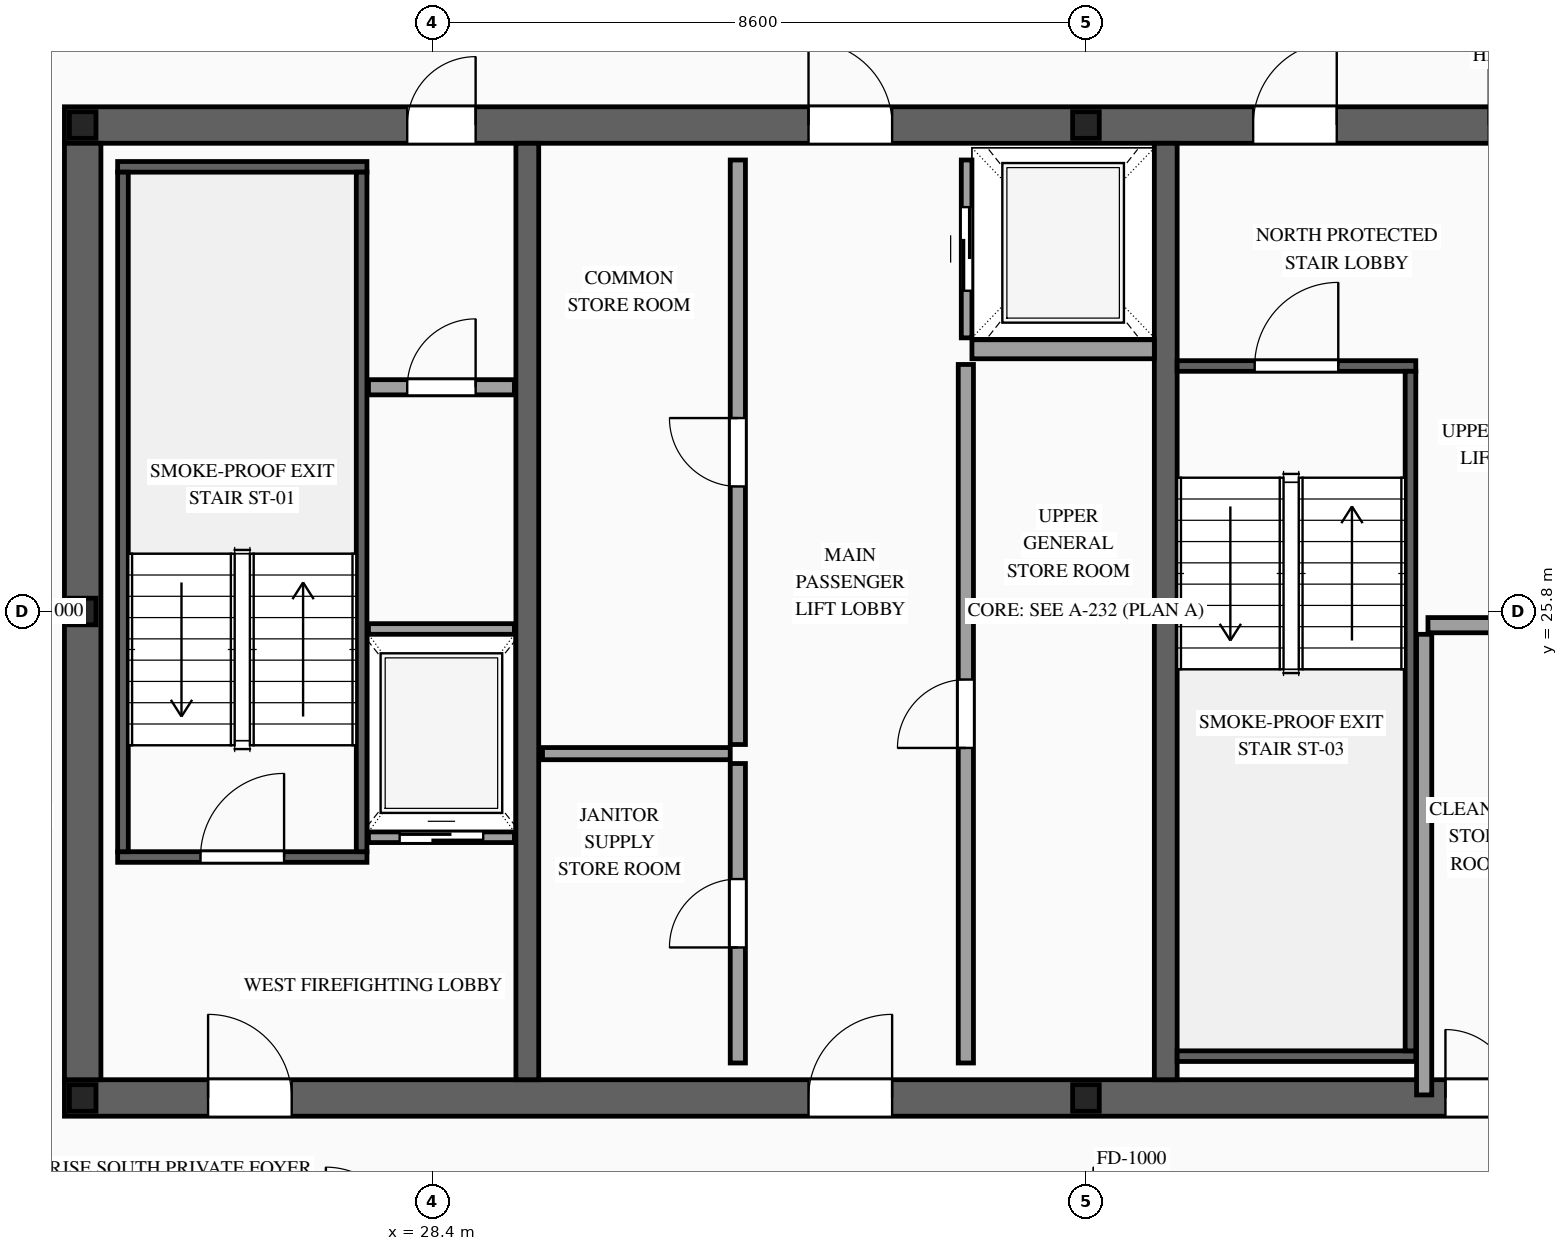
"""IFC4 building model, lengths in metres.
Left out: names, types, materials, properties, quantities, classifications, styles, units other than length and angle.
Written with IfcOpenShell. Run it as: python <this file> out.ifc"""

import sys

from ifc_helpers import new_model, si_unit, direction, frame, frame_2d, origin, origin_2d, place, context, subcontext, project, spatial, rectangle, i_section, extrude, source, transform, mapped, element, fill, save


model = new_model("IFC4")
c1 = context("Model", 3, precision=1e-05, world=origin(), true_north=direction((0.0, 1.0)))
c2 = subcontext(c1, "Body", "Model", "MODEL_VIEW")
j1 = project(units=[si_unit("LENGTHUNIT", "METRE"), si_unit("PLANEANGLEUNIT", "RADIAN")], contexts=[c1])
p1 = place(None, origin())
s1 = spatial("IfcSite", under=j1, at=p1, CompositionType="ELEMENT")
p2 = place(p1, origin())
s2 = spatial("IfcBuilding", under=s1, at=p2, CompositionType="ELEMENT")
p3 = place(p2, frame((0.0, 0.0, 332.2)))
s3 = spatial("IfcBuildingStorey", under=s2, at=p3, CompositionType="ELEMENT", Elevation=332.2)
p4 = place(p3, frame((23.56, 19.4, 0.0), z_axis=(0.0, 0.0, 1.0), x_axis=(1.0, 0.0, 0.0)))
e1 = element("IfcWall", 1, at=p4, inside=s3, PredefinedType="SHEAR", context=c2, shape_type="SweptSolid", body=[
    extrude(rectangle(XDim=26.88, YDim=0.48, at=frame_2d((13.44, 0.0))), origin(), (0.0, 0.0, 1.0), 3.5),
])
p5 = place(p4, frame((1.89, 0.0, 0.0)))
e2 = element("IfcOpeningElement", 2, at=p5, cuts=e1, PredefinedType="OPENING", context=c2, shape_type="SweptSolid", body=[
    extrude(rectangle(XDim=1.1, YDim=2.2, at=frame_2d((0.55, 1.1))), frame((0.0, 0.255, 0.0), z_axis=(0.0, -1.0, 0.0), x_axis=(1.0, 0.0, 0.0)), (0.0, 0.0, 1.0), 0.51),
])
p6 = place(p4, frame((9.79, 0.0, 0.0)))
e3 = element("IfcOpeningElement", 3, at=p6, cuts=e1, PredefinedType="OPENING", context=c2, shape_type="SweptSolid", body=[
    extrude(rectangle(XDim=1.1, YDim=2.2, at=frame_2d((0.55, 1.1))), frame((0.0, 0.255, 0.0), z_axis=(0.0, -1.0, 0.0), x_axis=(1.0, 0.0, 0.0)), (0.0, 0.0, 1.0), 0.51),
])
p7 = place(p4, frame((22.99, 0.0, 0.0)))
e4 = element("IfcOpeningElement", 4, at=p7, cuts=e1, PredefinedType="OPENING", context=c2, shape_type="SweptSolid", body=[
    extrude(rectangle(XDim=1.1, YDim=2.2, at=frame_2d((0.55, 1.1))), frame((0.0, 0.255, 0.0), z_axis=(0.0, -1.0, 0.0), x_axis=(1.0, 0.0, 0.0)), (0.0, 0.0, 1.0), 0.51),
])
p8 = place(p4, frame((19.61, 0.0, 0.0)))
e5 = element("IfcOpeningElement", 5, at=p8, cuts=e1, PredefinedType="OPENING", context=c2, shape_type="SweptSolid", body=[
    extrude(rectangle(XDim=0.9, YDim=2.15, at=frame_2d((0.45, 1.075))), frame((0.0, 0.255, 0.0), z_axis=(0.0, -1.0, 0.0), x_axis=(1.0, 0.0, 0.0)), (0.0, 0.0, 1.0), 0.51),
])
p9 = place(p4, frame((18.17, 0.0, 0.0)))
e6 = element("IfcOpeningElement", 6, at=p9, cuts=e1, PredefinedType="OPENING", context=c2, shape_type="SweptSolid", body=[
    extrude(rectangle(XDim=0.9, YDim=2.15, at=frame_2d((0.45, 1.075))), frame((0.0, 0.255, 0.0), z_axis=(0.0, -1.0, 0.0), x_axis=(1.0, 0.0, 0.0)), (0.0, 0.0, 1.0), 0.51),
])
p10 = place(p3, frame((23.56, 32.2, 0.0), z_axis=(0.0, 0.0, 1.0), x_axis=(1.0, 0.0, 0.0)))
e7 = element("IfcWall", 7, at=p10, inside=s3, PredefinedType="SHEAR", context=c2, shape_type="SweptSolid", body=[
    extrude(rectangle(XDim=26.88, YDim=0.48, at=frame_2d((13.44, 0.0))), origin(), (0.0, 0.0, 1.0), 3.5),
])
p11 = place(p10, frame((4.51, 0.0, 0.0)))
e8 = element("IfcOpeningElement", 8, at=p11, cuts=e7, PredefinedType="OPENING", context=c2, shape_type="SweptSolid", body=[
    extrude(rectangle(XDim=0.9, YDim=2.15, at=frame_2d((0.45, 1.075))), frame((0.0, 0.255, 0.0), z_axis=(0.0, -1.0, 0.0), x_axis=(1.0, 0.0, 0.0)), (0.0, 0.0, 1.0), 0.51),
])
p12 = place(p10, frame((9.79, 0.0, 0.0)))
e9 = element("IfcOpeningElement", 9, at=p12, cuts=e7, PredefinedType="OPENING", context=c2, shape_type="SweptSolid", body=[
    extrude(rectangle(XDim=1.1, YDim=2.2, at=frame_2d((0.55, 1.1))), frame((0.0, 0.255, 0.0), z_axis=(0.0, -1.0, 0.0), x_axis=(1.0, 0.0, 0.0)), (0.0, 0.0, 1.0), 0.51),
])
p13 = place(p10, frame((15.64, 0.0, 0.0)))
e10 = element("IfcOpeningElement", 10, at=p13, cuts=e7, PredefinedType="OPENING", context=c2, shape_type="SweptSolid", body=[
    extrude(rectangle(XDim=1.1, YDim=2.2, at=frame_2d((0.55, 1.1))), frame((0.0, 0.255, 0.0), z_axis=(0.0, -1.0, 0.0), x_axis=(1.0, 0.0, 0.0)), (0.0, 0.0, 1.0), 0.51),
])
p14 = place(p10, frame((18.74, 0.0, 0.0)))
e11 = element("IfcOpeningElement", 11, at=p14, cuts=e7, PredefinedType="OPENING", context=c2, shape_type="SweptSolid", body=[
    extrude(rectangle(XDim=1.1, YDim=2.2, at=frame_2d((0.55, 1.1))), frame((0.0, 0.255, 0.0), z_axis=(0.0, -1.0, 0.0), x_axis=(1.0, 0.0, 0.0)), (0.0, 0.0, 1.0), 0.51),
])
m1 = source(origin(), c2, "Body", "SweptSolid", [
    extrude(rectangle(XDim=12.32, YDim=0.48, at=frame_2d((6.16, 0.0))), origin(), (0.0, 0.0, 1.0), 3.5),
])
p15 = place(p3, frame((23.8, 19.64, 0.0), z_axis=(0.0, 0.0, 1.0), x_axis=(0.0, 1.0, 0.0)))
e12 = element("IfcWall", 12, at=p15, inside=s3, PredefinedType="SHEAR", context=c2, shape_type="MappedRepresentation", body=[
    mapped(m1, transform((0.0, 0.0, 0.0), scale=1.0)),
])
m2 = source(origin(), c2, "Body", "SweptSolid", [
    extrude(rectangle(XDim=12.32, YDim=0.3, at=frame_2d((6.16, 0.0))), origin(), (0.0, 0.0, 1.0), 3.5),
])
for number, where, z_axis, x_axis in (
    (13, (29.65, 19.64, 0.0), (0.0, 0.0, 1.0), (0.0, 1.0, 0.0)),
    (14, (38.05, 19.64, 0.0), (0.0, 0.0, 1.0), (0.0, 1.0, 0.0)),
):
    element("IfcWall", number, at=place(p3, frame(where, z_axis=z_axis, x_axis=x_axis)), inside=s3, PredefinedType="SOLIDWALL", context=c2, shape_type="MappedRepresentation", body=[
        mapped(m2, transform((0.0, 0.0, 0.0), scale=1.0)),
    ])
m3 = source(origin(), c2, "Body", "SweptSolid", [
    extrude(i_section(OverallWidth=0.35, OverallDepth=0.35, WebThickness=0.012, FlangeThickness=0.019, at=origin_2d()), origin(), (0.0, 0.0, 1.0), 3.5),
])
for number, where, z_axis, x_axis in (
    (15, (23.8, 19.4, 0.0), (0.0, 0.0, 1.0), (1.0, 0.0, 0.0)),
    (16, (37.0, 19.4, 0.0), (0.0, 0.0, 1.0), (1.0, 0.0, 0.0)),
    (17, (23.8, 25.8, 0.0), (0.0, 0.0, 1.0), (1.0, 0.0, 0.0)),
    (18, (23.8, 32.2, 0.0), (0.0, 0.0, 1.0), (1.0, 0.0, 0.0)),
    (19, (37.0, 32.2, 0.0), (0.0, 0.0, 1.0), (1.0, 0.0, 0.0)),
):
    element("IfcColumn", number, at=place(p3, frame(where, z_axis=z_axis, x_axis=x_axis)), inside=s3, PredefinedType="COLUMN", context=c2, shape_type="MappedRepresentation", body=[
        mapped(m3, transform((0.0, 0.0, 0.0), scale=1.0)),
    ])
p16 = place(p3, frame((27.56, 22.83, 0.0), z_axis=(0.0, 0.0, 1.0), x_axis=(1.0, 0.0, 0.0)))
e20 = element("IfcWall", 20, at=p16, inside=s3, PredefinedType="SOLIDWALL", context=c2, shape_type="SweptSolid", body=[
    extrude(rectangle(XDim=1.92, YDim=0.14, at=frame_2d((0.96, 0.0))), origin(), (0.0, 0.0, 1.0), 3.28),
])
p17 = place(p16, frame((0.41, 0.0, 0.0)))
e21 = element("IfcOpeningElement", 21, at=p17, cuts=e20, PredefinedType="OPENING", context=c2, shape_type="SweptSolid", body=[
    extrude(rectangle(XDim=1.1, YDim=2.2, at=frame_2d((0.55, 1.1))), frame((0.0, 0.085, 0.0), z_axis=(0.0, -1.0, 0.0), x_axis=(1.0, 0.0, 0.0)), (0.0, 0.0, 1.0), 0.17),
])
m4 = source(origin(), c2, "Body", "SweptSolid", [
    extrude(rectangle(XDim=1.92, YDim=0.14, at=frame_2d((0.96, 0.0))), origin(), (0.0, 0.0, 1.0), 3.28),
])
p18 = place(p3, frame((27.56, 25.57, 0.0), z_axis=(0.0, 0.0, 1.0), x_axis=(1.0, 0.0, 0.0)))
e22 = element("IfcWall", 22, at=p18, inside=s3, PredefinedType="SOLIDWALL", context=c2, shape_type="MappedRepresentation", body=[
    mapped(m4, transform((0.0, 0.0, 0.0), scale=1.0)),
])
p19 = place(p3, frame((35.43, 29.4, 0.0), z_axis=(0.0, 0.0, 1.0), x_axis=(0.0, 1.0, 0.0)))
e23 = element("IfcWall", 23, at=p19, inside=s3, PredefinedType="SOLIDWALL", context=c2, shape_type="SweptSolid", body=[
    extrude(rectangle(XDim=2.34, YDim=0.14, at=frame_2d((1.17, 0.0))), origin(), (0.0, 0.0, 1.0), 3.28),
])
p20 = place(p19, frame((0.62, 0.0, 0.0)))
e24 = element("IfcOpeningElement", 24, at=p20, cuts=e23, PredefinedType="OPENING", context=c2, shape_type="SweptSolid", body=[
    extrude(rectangle(XDim=1.1, YDim=2.2, at=frame_2d((0.55, 1.1))), frame((0.0, 0.085, 0.0), z_axis=(0.0, -1.0, 0.0), x_axis=(1.0, 0.0, 0.0)), (0.0, 0.0, 1.0), 0.17),
])
m5 = source(origin(), c2, "Body", "SweptSolid", [
    extrude(rectangle(XDim=2.4, YDim=0.25, at=frame_2d((1.2, 0.0))), origin(), (0.0, 0.0, 1.0), 3.28),
])
p21 = place(p3, frame((35.5, 29.25, 0.0), z_axis=(0.0, 0.0, 1.0), x_axis=(1.0, 0.0, 0.0)))
e25 = element("IfcWall", 25, at=p21, inside=s3, PredefinedType="SOLIDWALL", context=c2, shape_type="MappedRepresentation", body=[
    mapped(m5, transform((0.0, 0.0, 0.0), scale=1.0)),
])
p22 = place(p3, frame((24.26, 22.57, 0.0), z_axis=(0.0, 0.0, 1.0), x_axis=(1.0, 0.0, 0.0)))
e26 = element("IfcWall", 26, at=p22, inside=s3, PredefinedType="SOLIDWALL", context=c2, shape_type="SweptSolid", body=[
    extrude(rectangle(XDim=3.28, YDim=0.14, at=frame_2d((1.64, 0.0))), origin(), (0.0, 0.0, 1.0), 3.28),
])
p23 = place(p22, frame((1.09, 0.0, 0.0)))
e27 = element("IfcOpeningElement", 27, at=p23, cuts=e26, PredefinedType="OPENING", context=c2, shape_type="SweptSolid", body=[
    extrude(rectangle(XDim=1.1, YDim=2.2, at=frame_2d((0.55, 1.1))), frame((0.0, 0.085, 0.0), z_axis=(0.0, -1.0, 0.0), x_axis=(1.0, 0.0, 0.0)), (0.0, 0.0, 1.0), 0.17),
])
m6 = source(origin(), c2, "Body", "SweptSolid", [
    extrude(rectangle(XDim=3.28, YDim=0.14, at=frame_2d((1.64, 0.0))), origin(), (0.0, 0.0, 1.0), 3.28),
])
p24 = place(p3, frame((24.26, 31.65, 0.0), z_axis=(0.0, 0.0, 1.0), x_axis=(1.0, 0.0, 0.0)))
e28 = element("IfcWall", 28, at=p24, inside=s3, PredefinedType="SOLIDWALL", context=c2, shape_type="MappedRepresentation", body=[
    mapped(m6, transform((0.0, 0.0, 0.0), scale=1.0)),
])
m7 = source(origin(), c2, "Body", "SweptSolid", [
    extrude(rectangle(XDim=8.94, YDim=0.14, at=frame_2d((4.47, 0.0))), origin(), (0.0, 0.0, 1.0), 3.28),
])
for number, where, z_axis, x_axis in (
    (29, (24.33, 22.64, 0.0), (0.0, 0.0, 1.0), (0.0, 1.0, 0.0)),
    (30, (27.47, 22.64, 0.0), (0.0, 0.0, 1.0), (0.0, 1.0, 0.0)),
):
    element("IfcWall", number, at=place(p3, frame(where, z_axis=z_axis, x_axis=x_axis)), inside=s3, PredefinedType="SOLIDWALL", context=c2, shape_type="MappedRepresentation", body=[
        mapped(m7, transform((0.0, 0.0, 0.0), scale=1.0)),
    ])
p25 = place(p3, frame((38.2, 29.03, 0.0), z_axis=(0.0, 0.0, 1.0), x_axis=(1.0, 0.0, 0.0)))
e31 = element("IfcWall", 31, at=p25, inside=s3, PredefinedType="SOLIDWALL", context=c2, shape_type="SweptSolid", body=[
    extrude(rectangle(XDim=3.14, YDim=0.14, at=frame_2d((1.57, 0.0))), origin(), (0.0, 0.0, 1.0), 3.28),
])
p26 = place(p25, frame((1.02, 0.0, 0.0)))
e32 = element("IfcOpeningElement", 32, at=p26, cuts=e31, PredefinedType="OPENING", context=c2, shape_type="SweptSolid", body=[
    extrude(rectangle(XDim=1.1, YDim=2.2, at=frame_2d((0.55, 1.1))), frame((0.0, 0.085, 0.0), z_axis=(0.0, -1.0, 0.0), x_axis=(1.0, 0.0, 0.0)), (0.0, 0.0, 1.0), 0.17),
])
m8 = source(origin(), c2, "Body", "SweptSolid", [
    extrude(rectangle(XDim=3.14, YDim=0.14, at=frame_2d((1.57, 0.0))), origin(), (0.0, 0.0, 1.0), 3.28),
])
p27 = place(p3, frame((38.2, 19.95, 0.0), z_axis=(0.0, 0.0, 1.0), x_axis=(1.0, 0.0, 0.0)))
e33 = element("IfcWall", 33, at=p27, inside=s3, PredefinedType="SOLIDWALL", context=c2, shape_type="MappedRepresentation", body=[
    mapped(m8, transform((0.0, 0.0, 0.0), scale=1.0)),
])
m9 = source(origin(), c2, "Body", "SweptSolid", [
    extrude(rectangle(XDim=8.94, YDim=0.14, at=frame_2d((4.47, 0.0))), origin(), (0.0, 0.0, 1.0), 3.28),
])
p28 = place(p3, frame((41.27, 20.02, 0.0), z_axis=(0.0, 0.0, 1.0), x_axis=(0.0, 1.0, 0.0)))
e34 = element("IfcWall", 34, at=p28, inside=s3, PredefinedType="SOLIDWALL", context=c2, shape_type="MappedRepresentation", body=[
    mapped(m9, transform((0.0, 0.0, 0.0), scale=1.0)),
])
p29 = place(p3, frame((27.56, 28.75, 0.0), z_axis=(0.0, 0.0, 1.0), x_axis=(1.0, 0.0, 0.0)))
e35 = element("IfcWall", 35, at=p29, inside=s3, PredefinedType="PARTITIONING", context=c2, shape_type="SweptSolid", body=[
    extrude(rectangle(XDim=1.92, YDim=0.2, at=frame_2d((0.96, 0.0))), origin(), (0.0, 0.0, 1.0), 3.28),
])
p30 = place(p29, frame((0.51, 0.0, 0.0)))
e36 = element("IfcOpeningElement", 36, at=p30, cuts=e35, PredefinedType="OPENING", context=c2, shape_type="SweptSolid", body=[
    extrude(rectangle(XDim=0.9, YDim=2.15, at=frame_2d((0.45, 1.075))), frame((0.0, 0.115, 0.0), z_axis=(0.0, -1.0, 0.0), x_axis=(1.0, 0.0, 0.0)), (0.0, 0.0, 1.0), 0.23),
])
p31 = place(p3, frame((32.42, 19.86, 0.0), z_axis=(0.0, 0.0, 1.0), x_axis=(0.0, 1.0, 0.0)))
e37 = element("IfcWall", 37, at=p31, inside=s3, PredefinedType="PARTITIONING", context=c2, shape_type="SweptSolid", body=[
    extrude(rectangle(XDim=3.94, YDim=0.2, at=frame_2d((1.97, 0.0))), origin(), (0.0, 0.0, 1.0), 3.28),
])
p32 = place(p31, frame((1.52, 0.0, 0.0)))
e38 = element("IfcOpeningElement", 38, at=p32, cuts=e37, PredefinedType="OPENING", context=c2, shape_type="SweptSolid", body=[
    extrude(rectangle(XDim=0.9, YDim=2.15, at=frame_2d((0.45, 1.075))), frame((0.0, 0.115, 0.0), z_axis=(0.0, -1.0, 0.0), x_axis=(1.0, 0.0, 0.0)), (0.0, 0.0, 1.0), 0.23),
])
p33 = place(p3, frame((32.42, 24.05, 0.0), z_axis=(0.0, 0.0, 1.0), x_axis=(0.0, 1.0, 0.0)))
e39 = element("IfcWall", 39, at=p33, inside=s3, PredefinedType="PARTITIONING", context=c2, shape_type="SweptSolid", body=[
    extrude(rectangle(XDim=7.69, YDim=0.2, at=frame_2d((3.845, 0.0))), origin(), (0.0, 0.0, 1.0), 3.28),
])
p34 = place(p33, frame((3.395, 0.0, 0.0)))
e40 = element("IfcOpeningElement", 40, at=p34, cuts=e39, PredefinedType="OPENING", context=c2, shape_type="SweptSolid", body=[
    extrude(rectangle(XDim=0.9, YDim=2.15, at=frame_2d((0.45, 1.075))), frame((0.0, 0.115, 0.0), z_axis=(0.0, -1.0, 0.0), x_axis=(1.0, 0.0, 0.0)), (0.0, 0.0, 1.0), 0.23),
])
m10 = source(origin(), c2, "Body", "SweptSolid", [
    extrude(rectangle(XDim=2.47, YDim=0.16, at=frame_2d((1.235, 0.0))), origin(), (0.0, 0.0, 1.0), 3.28),
])
p35 = place(p3, frame((29.85, 23.93, 0.0), z_axis=(0.0, 0.0, 1.0), x_axis=(1.0, 0.0, 0.0)))
e41 = element("IfcWall", 41, at=p35, inside=s3, PredefinedType="PARTITIONING", context=c2, shape_type="MappedRepresentation", body=[
    mapped(m10, transform((0.0, 0.0, 0.0), scale=1.0)),
])
p36 = place(p3, frame((35.42, 19.86, 0.0), z_axis=(0.0, 0.0, 1.0), x_axis=(0.0, 1.0, 0.0)))
e42 = element("IfcWall", 42, at=p36, inside=s3, PredefinedType="PARTITIONING", context=c2, shape_type="SweptSolid", body=[
    extrude(rectangle(XDim=9.19, YDim=0.2, at=frame_2d((4.595, 0.0))), origin(), (0.0, 0.0, 1.0), 3.28),
])
p37 = place(p36, frame((4.145, 0.0, 0.0)))
e43 = element("IfcOpeningElement", 43, at=p37, cuts=e42, PredefinedType="OPENING", context=c2, shape_type="SweptSolid", body=[
    extrude(rectangle(XDim=0.9, YDim=2.15, at=frame_2d((0.45, 1.075))), frame((0.0, 0.115, 0.0), z_axis=(0.0, -1.0, 0.0), x_axis=(1.0, 0.0, 0.0)), (0.0, 0.0, 1.0), 0.23),
])
m11 = source(origin(), c2, "Body", "SweptSolid", [
    extrude(rectangle(XDim=6.06, YDim=0.2, at=frame_2d((3.03, 0.0))), origin(), (0.0, 0.0, 1.0), 3.28),
])
p38 = place(p3, frame((41.45, 19.44, 0.0), z_axis=(0.0, 0.0, 1.0), x_axis=(0.0, 1.0, 0.0)))
e44 = element("IfcWall", 44, at=p38, inside=s3, PredefinedType="PARTITIONING", context=c2, shape_type="MappedRepresentation", body=[
    mapped(m11, transform((0.0, 0.0, 0.0), scale=1.0)),
])
m12 = source(origin(), c2, "Body", "SweptSolid", [
    extrude(rectangle(XDim=1.35, YDim=0.2, at=frame_2d((0.675, 0.0))), origin(), (0.0, 0.0, 1.0), 3.28),
])
p39 = place(p3, frame((41.5, 25.62, 0.0), z_axis=(0.0, 0.0, 1.0), x_axis=(1.0, 0.0, 0.0)))
e45 = element("IfcWall", 45, at=p39, inside=s3, PredefinedType="PARTITIONING", context=c2, shape_type="MappedRepresentation", body=[
    mapped(m12, transform((0.0, 0.0, 0.0), scale=1.0)),
])
m13 = source(origin(), c2, "Body", "SweptSolid", [
    extrude(rectangle(XDim=1.1, YDim=2.2, at=frame_2d((0.55, 1.1))), frame((0.0, 0.025, 0.0), z_axis=(0.0, -1.0, 0.0), x_axis=(1.0, 0.0, 0.0)), (0.0, 0.0, 1.0), 0.05),
])
p40 = place(p17, origin())
e46 = element("IfcDoor", 46, at=p40, inside=s3, OperationType="SLIDING_TO_LEFT", PredefinedType="DOOR", context=c2, shape_type="MappedRepresentation", body=[
    mapped(m13, transform((0.0, 0.0, 0.0), scale=1.0)),
])
fill(e21, e46)
p41 = place(p20, origin())
e47 = element("IfcDoor", 47, at=p41, inside=s3, OperationType="SLIDING_TO_RIGHT", PredefinedType="DOOR", context=c2, shape_type="MappedRepresentation", body=[
    mapped(m13, transform((0.0, 0.0, 0.0), scale=1.0)),
])
fill(e24, e47)
m14 = source(origin(), c2, "Body", "SweptSolid", [
    extrude(rectangle(XDim=1.1, YDim=2.2, at=frame_2d((0.55, 1.1))), frame((0.0, 0.025, 0.0), z_axis=(0.0, -1.0, 0.0), x_axis=(1.0, 0.0, 0.0)), (0.0, 0.0, 1.0), 0.05),
])
p42 = place(p23, origin())
e48 = element("IfcDoor", 48, at=p42, inside=s3, OperationType="SINGLE_SWING_RIGHT", PredefinedType="DOOR", context=c2, shape_type="MappedRepresentation", body=[
    mapped(m14, transform((0.0, 0.0, 0.0), scale=1.0)),
])
fill(e27, e48)
p43 = place(p26, origin())
e49 = element("IfcDoor", 49, at=p43, inside=s3, OperationType="SINGLE_SWING_RIGHT", PredefinedType="DOOR", context=c2, shape_type="MappedRepresentation", body=[
    mapped(m14, transform((0.0, 0.0, 0.0), scale=1.0)),
])
fill(e32, e49)
p44 = place(p5, origin())
e50 = element("IfcDoor", 50, at=p44, inside=s3, OperationType="SINGLE_SWING_LEFT", PredefinedType="DOOR", context=c2, shape_type="MappedRepresentation", body=[
    mapped(m14, transform((0.0, 0.0, 0.0), scale=1.0)),
])
fill(e2, e50)
p45 = place(p6, origin())
e51 = element("IfcDoor", 51, at=p45, inside=s3, OperationType="SINGLE_SWING_RIGHT", PredefinedType="DOOR", context=c2, shape_type="MappedRepresentation", body=[
    mapped(m14, transform((0.0, 0.0, 0.0), scale=1.0)),
])
fill(e3, e51)
m15 = source(origin(), c2, "Body", "SweptSolid", [
    extrude(rectangle(XDim=0.9, YDim=2.15, at=frame_2d((0.45, 1.075))), frame((0.0, 0.025, 0.0), z_axis=(0.0, -1.0, 0.0), x_axis=(1.0, 0.0, 0.0)), (0.0, 0.0, 1.0), 0.05),
])
p46 = place(p11, origin())
e52 = element("IfcDoor", 52, at=p46, inside=s3, OperationType="SINGLE_SWING_RIGHT", PredefinedType="DOOR", context=c2, shape_type="MappedRepresentation", body=[
    mapped(m15, transform((0.0, 0.0, 0.0), scale=1.0)),
])
fill(e8, e52)
p47 = place(p12, origin())
e53 = element("IfcDoor", 53, at=p47, inside=s3, OperationType="SINGLE_SWING_LEFT", PredefinedType="DOOR", context=c2, shape_type="MappedRepresentation", body=[
    mapped(m14, transform((0.0, 0.0, 0.0), scale=1.0)),
])
fill(e9, e53)
p48 = place(p13, origin())
e54 = element("IfcDoor", 54, at=p48, inside=s3, OperationType="SINGLE_SWING_RIGHT", PredefinedType="DOOR", context=c2, shape_type="MappedRepresentation", body=[
    mapped(m14, transform((0.0, 0.0, 0.0), scale=1.0)),
])
fill(e10, e54)
p49 = place(p30, origin())
e55 = element("IfcDoor", 55, at=p49, inside=s3, OperationType="SINGLE_SWING_RIGHT", PredefinedType="DOOR", context=c2, shape_type="MappedRepresentation", body=[
    mapped(m15, transform((0.0, 0.0, 0.0), scale=1.0)),
])
fill(e36, e55)
p50 = place(p32, origin())
e56 = element("IfcDoor", 56, at=p50, inside=s3, OperationType="SINGLE_SWING_LEFT", PredefinedType="DOOR", context=c2, shape_type="MappedRepresentation", body=[
    mapped(m15, transform((0.0, 0.0, 0.0), scale=1.0)),
])
fill(e38, e56)
p51 = place(p34, origin())
e57 = element("IfcDoor", 57, at=p51, inside=s3, OperationType="SINGLE_SWING_RIGHT", PredefinedType="DOOR", context=c2, shape_type="MappedRepresentation", body=[
    mapped(m15, transform((0.0, 0.0, 0.0), scale=1.0)),
])
fill(e40, e57)
p52 = place(p37, origin())
e58 = element("IfcDoor", 58, at=p52, inside=s3, OperationType="SINGLE_SWING_LEFT", PredefinedType="DOOR", context=c2, shape_type="MappedRepresentation", body=[
    mapped(m15, transform((0.0, 0.0, 0.0), scale=1.0)),
])
fill(e43, e58)
p53 = place(p9, origin())
e59 = element("IfcDoor", 59, at=p53, inside=s3, OperationType="SINGLE_SWING_LEFT", PredefinedType="DOOR", context=c2, shape_type="MappedRepresentation", body=[
    mapped(m15, transform((0.0, 0.0, 0.0), scale=1.0)),
])
fill(e6, e59)
save(model, sys.argv[1])
